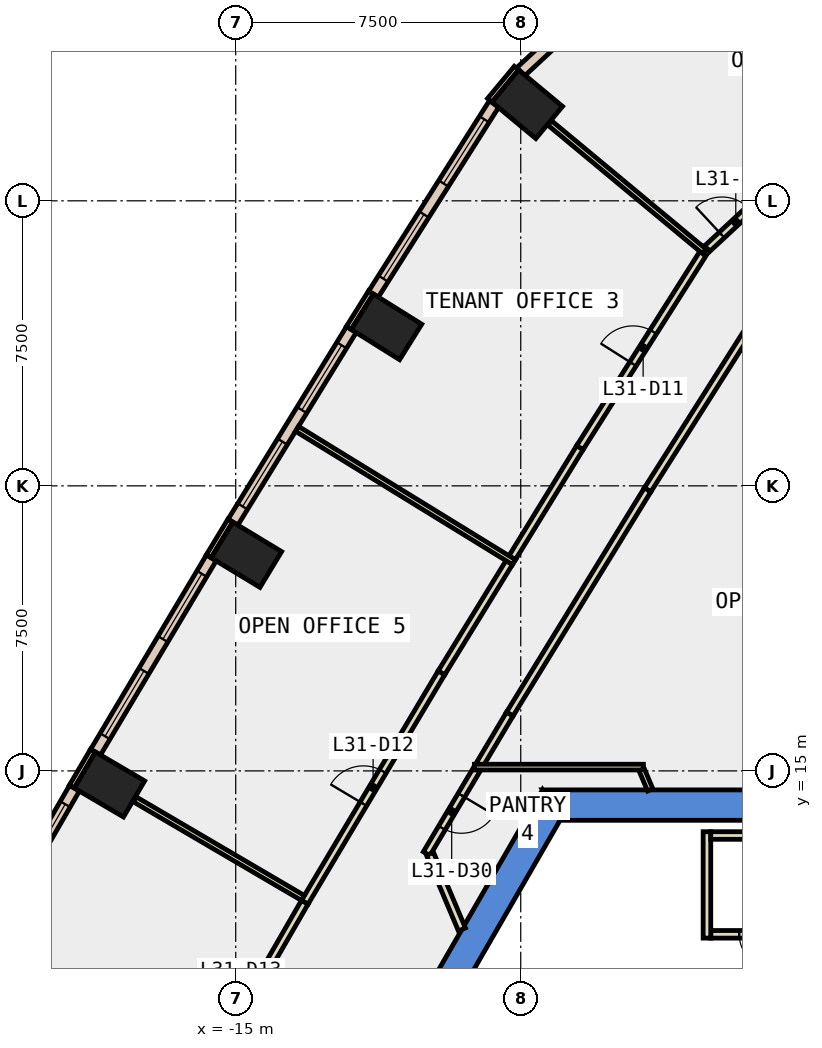
"""IFC4 building model, lengths in metres.
Left out: names, types, materials, properties, quantities, classifications, styles, units other than length and angle.
Written with IfcOpenShell. Run it as: python <this file> out.ifc"""

import sys

from ifc_helpers import new_model, si_unit, direction, frame, frame_2d, origin, origin_2d, place, context, subcontext, project, spatial, polyline, rectangle, outline, extrude, element, fill, save


model = new_model("IFC4")
c1 = context("Model", 3, precision=1e-05, world=origin(), true_north=direction((0.0, 1.0)))
c2 = subcontext(c1, "Body", "Model", "MODEL_VIEW")
j1 = project(units=[si_unit("LENGTHUNIT", "METRE"), si_unit("PLANEANGLEUNIT", "RADIAN")], contexts=[c1])
p1 = place(None, origin())
s1 = spatial("IfcSite", under=j1, at=p1, CompositionType="ELEMENT")
p2 = place(p1, origin())
s2 = spatial("IfcBuilding", under=s1, at=p2, CompositionType="ELEMENT")
p3 = place(p2, frame((0.0, 0.0, 142.4)))
s3 = spatial("IfcBuildingStorey", under=s2, at=p3, CompositionType="ELEMENT", Elevation=142.4)
for number, where, z_axis, x_axis in (
    (1, (-7.329, 32.541, -0.4), (0.0, 0.0, 1.0), (0.639, 0.769, 0.0)),
    (2, (-11.033, 26.684, -0.4), (0.0, 0.0, 1.0), (0.53, 0.848, 0.0)),
    (3, (-14.719, 20.688, -0.4), (0.0, 0.0, 1.0), (0.518, 0.855, 0.0)),
    (4, (-18.322, 14.642, -0.4), (0.0, 0.0, 1.0), (0.506, 0.863, 0.0)),
):
    element("IfcColumn", number, at=place(p3, frame(where, z_axis=z_axis, x_axis=x_axis)), inside=s3, PredefinedType="COLUMN", context=c2, shape_type="SweptSolid", body=[
        extrude(rectangle(XDim=1.1, YDim=1.5, at=origin_2d()), origin(), (0.0, 0.0, 1.0), 4.2),
    ])
p4 = place(p3, frame((0.0, 0.0, -0.4)))
e5 = element("IfcWall", 5, at=p4, inside=s3, PredefinedType="SHEAR", context=c2, shape_type="SweptSolid", body=[
    extrude(outline(polyline([(6.928, 14.5), (-6.928, 14.5), (-6.466, 13.7), (6.466, 13.7), (6.928, 14.5)])), origin(), (0.0, 0.0, 1.0), 4.2),
])
p5 = place(p3, frame((0.0, 0.0, -0.4)))
e6 = element("IfcWall", 6, at=p5, inside=s3, PredefinedType="SHEAR", context=c2, shape_type="SweptSolid", body=[
    extrude(outline(polyline([(-12.267, 5.252), (-11.575, 4.852), (-6.466, 13.7), (-6.928, 14.5), (-12.267, 5.252)])), origin(), (0.0, 0.0, 1.0), 4.2),
])
p6 = place(p3, frame((-7.612, 33.491, 0.0), z_axis=(0.0, 0.0, 1.0), x_axis=(-0.639070205934, -0.769148406933, 0.0)))
e7 = element("IfcWall", 7, at=p6, inside=s3, PredefinedType="STANDARD", context=c2, shape_type="SweptSolid", body=[
    extrude(rectangle(XDim=1.1, YDim=0.15, at=frame_2d((0.55, 0.0))), origin(), (0.0, 0.0, 1.0), 3.8),
])
for number, where, z_axis, x_axis in (
    (8, (-11.441, 27.588, 0.0), (0.0, 0.0, 1.0), (-0.53, -0.848, 0.0)),
    (9, (-15.14, 21.586, 0.0), (0.0, 0.0, 1.0), (-0.518, -0.855, 0.0)),
):
    element("IfcWall", number, at=place(p3, frame(where, z_axis=z_axis, x_axis=x_axis)), inside=s3, PredefinedType="STANDARD", context=c2, shape_type="SweptSolid", body=[
        extrude(rectangle(XDim=1.1, YDim=0.15, at=frame_2d((0.55, 0.0))), origin(), (0.0, 0.0, 1.0), 3.8),
    ])
p7 = place(p3, frame((-18.755, 15.533, 0.0), z_axis=(0.0, 0.0, 1.0), x_axis=(-0.50667077411, -0.862139621327, 0.0)))
e10 = element("IfcWall", 10, at=p7, inside=s3, PredefinedType="STANDARD", context=c2, shape_type="SweptSolid", body=[
    extrude(rectangle(XDim=1.1, YDim=0.15, at=frame_2d((0.55, 0.0))), origin(), (0.0, 0.0, 1.0), 3.8),
])
p8 = place(p3, frame((-4.91, 35.805, 0.0), z_axis=(0.0, 0.0, 1.0), x_axis=(-0.732121882671, -0.681173655475, 0.0)))
e11 = element("IfcWall", 11, at=p8, inside=s3, PredefinedType="STANDARD", context=c2, shape_type="SweptSolid", body=[
    extrude(rectangle(XDim=3.536, YDim=0.3, at=frame_2d((1.768, 0.0))), origin(), (0.0, 0.0, 1.0), 3.8),
])
p9 = place(p8, frame((1.068, 0.0, 0.9)))
e12 = element("IfcOpeningElement", 12, at=p9, cuts=e11, PredefinedType="OPENING", context=c2, shape_type="SweptSolid", body=[
    extrude(rectangle(XDim=1.4, YDim=2.6, at=frame_2d((0.7, 1.3))), frame((0.0, 0.16, 0.0), z_axis=(0.0, -1.0, 0.0), x_axis=(1.0, 0.0, 0.0)), (0.0, 0.0, 1.0), 0.32),
])
p10 = place(p3, frame((-8.201, 32.552, 0.0), z_axis=(0.0, 0.0, 1.0), x_axis=(-0.535403761464, -0.844596242124, 0.0)))
e13 = element("IfcWall", 13, at=p10, inside=s3, PredefinedType="STANDARD", context=c2, shape_type="SweptSolid", body=[
    extrude(rectangle(XDim=5.928, YDim=0.3, at=frame_2d((2.964, 0.0))), origin(), (0.0, 0.0, 1.0), 3.8),
])
p11 = place(p10, frame((0.482, 0.0, 0.9)))
e14 = element("IfcOpeningElement", 14, at=p11, cuts=e13, PredefinedType="OPENING", context=c2, shape_type="SweptSolid", body=[
    extrude(rectangle(XDim=2.0, YDim=2.6, at=frame_2d((1.0, 1.3))), frame((0.0, 0.16, 0.0), z_axis=(0.0, -1.0, 0.0), x_axis=(1.0, 0.0, 0.0)), (0.0, 0.0, 1.0), 0.32),
])
p12 = place(p10, frame((3.446, 0.0, 0.9)))
e15 = element("IfcOpeningElement", 15, at=p12, cuts=e13, PredefinedType="OPENING", context=c2, shape_type="SweptSolid", body=[
    extrude(rectangle(XDim=2.0, YDim=2.6, at=frame_2d((1.0, 1.3))), frame((0.0, 0.16, 0.0), z_axis=(0.0, -1.0, 0.0), x_axis=(1.0, 0.0, 0.0)), (0.0, 0.0, 1.0), 0.32),
])
p13 = place(p3, frame((-11.956, 26.614, 0.0), z_axis=(0.0, 0.0, 1.0), x_axis=(-0.523719731127, -0.851890628677, 0.0)))
e16 = element("IfcWall", 16, at=p13, inside=s3, PredefinedType="STANDARD", context=c2, shape_type="SweptSolid", body=[
    extrude(rectangle(XDim=5.952, YDim=0.3, at=frame_2d((2.976, 0.0))), origin(), (0.0, 0.0, 1.0), 3.8),
])
p14 = place(p13, frame((0.488, 0.0, 0.9)))
e17 = element("IfcOpeningElement", 17, at=p14, cuts=e16, PredefinedType="OPENING", context=c2, shape_type="SweptSolid", body=[
    extrude(rectangle(XDim=2.0, YDim=2.6, at=frame_2d((1.0, 1.3))), frame((0.0, 0.16, 0.0), z_axis=(0.0, -1.0, 0.0), x_axis=(1.0, 0.0, 0.0)), (0.0, 0.0, 1.0), 0.32),
])
p15 = place(p13, frame((3.464, 0.0, 0.9)))
e18 = element("IfcOpeningElement", 18, at=p15, cuts=e16, PredefinedType="OPENING", context=c2, shape_type="SweptSolid", body=[
    extrude(rectangle(XDim=2.0, YDim=2.6, at=frame_2d((1.0, 1.3))), frame((0.0, 0.16, 0.0), z_axis=(0.0, -1.0, 0.0), x_axis=(1.0, 0.0, 0.0)), (0.0, 0.0, 1.0), 0.32),
])
p16 = place(p3, frame((-15.642, 20.605, 0.0), z_axis=(0.0, 0.0, 1.0), x_axis=(-0.511856715331, -0.859070836992, 0.0)))
e19 = element("IfcWall", 19, at=p16, inside=s3, PredefinedType="STANDARD", context=c2, shape_type="SweptSolid", body=[
    extrude(rectangle(XDim=5.951, YDim=0.3, at=frame_2d((2.975, 0.0))), origin(), (0.0, 0.0, 1.0), 3.8),
])
p17 = place(p16, frame((0.488, 0.0, 0.9)))
e20 = element("IfcOpeningElement", 20, at=p17, cuts=e19, PredefinedType="OPENING", context=c2, shape_type="SweptSolid", body=[
    extrude(rectangle(XDim=2.0, YDim=2.6, at=frame_2d((1.0, 1.3))), frame((0.0, 0.16, 0.0), z_axis=(0.0, -1.0, 0.0), x_axis=(1.0, 0.0, 0.0)), (0.0, 0.0, 1.0), 0.32),
])
p18 = place(p16, frame((3.463, 0.0, 0.9)))
e21 = element("IfcOpeningElement", 21, at=p18, cuts=e19, PredefinedType="OPENING", context=c2, shape_type="SweptSolid", body=[
    extrude(rectangle(XDim=2.0, YDim=2.6, at=frame_2d((1.0, 1.3))), frame((0.0, 0.16, 0.0), z_axis=(0.0, -1.0, 0.0), x_axis=(1.0, 0.0, 0.0)), (0.0, 0.0, 1.0), 0.32),
])
p19 = place(p3, frame((-19.243, 14.546, 0.0), z_axis=(0.0, 0.0, 1.0), x_axis=(-0.49994263896, -0.866058518664, 0.0)))
e22 = element("IfcWall", 22, at=p19, inside=s3, PredefinedType="STANDARD", context=c2, shape_type="SweptSolid", body=[
    extrude(rectangle(XDim=5.951, YDim=0.3, at=frame_2d((2.976, 0.0))), origin(), (0.0, 0.0, 1.0), 3.8),
])
p20 = place(p19, frame((0.488, 0.0, 0.9)))
e23 = element("IfcOpeningElement", 23, at=p20, cuts=e22, PredefinedType="OPENING", context=c2, shape_type="SweptSolid", body=[
    extrude(rectangle(XDim=2.0, YDim=2.6, at=frame_2d((1.0, 1.3))), frame((0.0, 0.16, 0.0), z_axis=(0.0, -1.0, 0.0), x_axis=(1.0, 0.0, 0.0)), (0.0, 0.0, 1.0), 0.32),
])
p21 = place(p19, frame((3.463, 0.0, 0.9)))
e24 = element("IfcOpeningElement", 24, at=p21, cuts=e22, PredefinedType="OPENING", context=c2, shape_type="SweptSolid", body=[
    extrude(rectangle(XDim=2.0, YDim=2.6, at=frame_2d((1.0, 1.3))), frame((0.0, 0.16, 0.0), z_axis=(0.0, -1.0, 0.0), x_axis=(1.0, 0.0, 0.0)), (0.0, 0.0, 1.0), 0.32),
])
p22 = place(p3, frame((-8.658, 15.036, 0.0), z_axis=(0.0, 0.0, 1.0), x_axis=(-0.511860217954, -0.859068750029, 0.0)))
e25 = element("IfcWall", 25, at=p22, inside=s3, PredefinedType="PARTITIONING", context=c2, shape_type="SweptSolid", body=[
    extrude(rectangle(XDim=2.577, YDim=0.2, at=frame_2d((1.289, 0.0))), origin(), (0.0, 0.0, 1.0), 3.8),
])
p23 = place(p22, frame((0.788, 0.0, 0.0)))
e26 = element("IfcOpeningElement", 26, at=p23, cuts=e25, PredefinedType="OPENING", context=c2, shape_type="SweptSolid", body=[
    extrude(rectangle(XDim=1.0, YDim=2.1, at=frame_2d((0.5, 1.05))), frame((0.0, 0.11, 0.0), z_axis=(0.0, -1.0, 0.0), x_axis=(1.0, 0.0, 0.0)), (0.0, 0.0, 1.0), 0.22),
])
p24 = place(p3, frame((-9.887, 12.816, 0.0), z_axis=(0.0, 0.0, 1.0), x_axis=(0.388765037942, -0.921336933632, 0.0)))
e27 = element("IfcWall", 27, at=p24, inside=s3, PredefinedType="PARTITIONING", context=c2, shape_type="SweptSolid", body=[
    extrude(rectangle(XDim=2.158, YDim=0.2, at=frame_2d((1.079, 0.0))), origin(), (0.0, 0.0, 1.0), 3.8),
])
p25 = place(p3, frame((-0.988, 27.401, 0.0), z_axis=(0.0, 0.0, 1.0), x_axis=(-0.535496886312, -0.844537201519, 0.0)))
e28 = element("IfcWall", 28, at=p25, inside=s3, PredefinedType="PARTITIONING", context=c2, shape_type="SweptSolid", body=[
    extrude(rectangle(XDim=5.927, YDim=0.2, at=frame_2d((2.964, 0.0))), origin(), (0.0, 0.0, 1.0), 3.8),
])
p26 = place(p3, frame((-4.162, 22.395, 0.0), z_axis=(0.0, 0.0, 1.0), x_axis=(-0.523625371849, -0.851948631055, 0.0)))
e29 = element("IfcWall", 29, at=p26, inside=s3, PredefinedType="PARTITIONING", context=c2, shape_type="SweptSolid", body=[
    extrude(rectangle(XDim=6.927, YDim=0.2, at=frame_2d((3.463, 0.0))), origin(), (0.0, 0.0, 1.0), 3.8),
])
p27 = place(p3, frame((-7.789, 16.494, 0.0), z_axis=(0.0, 0.0, 1.0), x_axis=(-0.511686277462, -0.859172365394, 0.0)))
e30 = element("IfcWall", 30, at=p27, inside=s3, PredefinedType="PARTITIONING", context=c2, shape_type="SweptSolid", body=[
    extrude(rectangle(XDim=1.548, YDim=0.2, at=frame_2d((0.774, 0.0))), origin(), (0.0, 0.0, 1.0), 3.8),
])
p28 = place(p3, frame((-2.597, 28.738, 0.0), z_axis=(0.0, 0.0, 1.0), x_axis=(0.73206471367, 0.681235095249, 0.0)))
e31 = element("IfcWall", 31, at=p28, inside=s3, PredefinedType="PARTITIONING", context=c2, shape_type="SweptSolid", body=[
    extrude(rectangle(XDim=2.065, YDim=0.2, at=frame_2d((1.033, 0.0))), origin(), (0.0, 0.0, 1.0), 3.8),
])
p29 = place(p28, frame((0.532, 0.0, 0.0)))
e32 = element("IfcOpeningElement", 32, at=p29, cuts=e31, PredefinedType="OPENING", context=c2, shape_type="SweptSolid", body=[
    extrude(rectangle(XDim=1.0, YDim=2.1, at=frame_2d((0.5, 1.05))), frame((0.0, 0.11, 0.0), z_axis=(0.0, -1.0, 0.0), x_axis=(1.0, 0.0, 0.0)), (0.0, 0.0, 1.0), 0.22),
])
p30 = place(p3, frame((-7.725, 20.608, 0.0), z_axis=(0.0, 0.0, 1.0), x_axis=(0.523645038298, 0.851936543333, 0.0)))
e33 = element("IfcWall", 33, at=p30, inside=s3, PredefinedType="PARTITIONING", context=c2, shape_type="SweptSolid", body=[
    extrude(rectangle(XDim=3.403, YDim=0.2, at=frame_2d((1.702, 0.0))), origin(), (0.0, 0.0, 1.0), 3.8),
])
p31 = place(p3, frame((-5.943, 23.507, 0.0), z_axis=(0.0, 0.0, 1.0), x_axis=(0.535529721247, 0.844516380931, 0.0)))
e34 = element("IfcWall", 34, at=p31, inside=s3, PredefinedType="PARTITIONING", context=c2, shape_type="SweptSolid", body=[
    extrude(rectangle(XDim=6.213, YDim=0.2, at=frame_2d((3.106, 0.0))), origin(), (0.0, 0.0, 1.0), 3.8),
])
p32 = place(p31, frame((2.607, 0.0, 0.0)))
e35 = element("IfcOpeningElement", 35, at=p32, cuts=e34, PredefinedType="OPENING", context=c2, shape_type="SweptSolid", body=[
    extrude(rectangle(XDim=1.0, YDim=2.1, at=frame_2d((0.5, 1.05))), frame((0.0, 0.11, 0.0), z_axis=(0.0, -1.0, 0.0), x_axis=(1.0, 0.0, 0.0)), (0.0, 0.0, 1.0), 0.22),
])
p33 = place(p3, frame((-13.184, 11.542, 0.0), z_axis=(0.0, 0.0, 1.0), x_axis=(0.511847713534, 0.859076200433, 0.0)))
e36 = element("IfcWall", 36, at=p33, inside=s3, PredefinedType="PARTITIONING", context=c2, shape_type="SweptSolid", body=[
    extrude(rectangle(XDim=7.03, YDim=0.2, at=frame_2d((3.515, 0.0))), origin(), (0.0, 0.0, 1.0), 3.8),
])
p34 = place(p33, frame((3.015, 0.0, 0.0)))
e37 = element("IfcOpeningElement", 37, at=p34, cuts=e36, PredefinedType="OPENING", context=c2, shape_type="SweptSolid", body=[
    extrude(rectangle(XDim=1.0, YDim=2.1, at=frame_2d((0.5, 1.05))), frame((0.0, 0.11, 0.0), z_axis=(0.0, -1.0, 0.0), x_axis=(1.0, 0.0, 0.0)), (0.0, 0.0, 1.0), 0.22),
])
p35 = place(p3, frame((-9.586, 17.581, 0.0), z_axis=(0.0, 0.0, 1.0), x_axis=(0.523757261565, 0.851867554822, 0.0)))
e38 = element("IfcWall", 38, at=p35, inside=s3, PredefinedType="PARTITIONING", context=c2, shape_type="SweptSolid", body=[
    extrude(rectangle(XDim=3.404, YDim=0.2, at=frame_2d((1.702, 0.0))), origin(), (0.0, 0.0, 1.0), 3.8),
])
p36 = place(p3, frame((-16.624, 5.582, 0.0), z_axis=(0.0, 0.0, 1.0), x_axis=(0.499886250151, 0.866091067331, 0.0)))
e39 = element("IfcWall", 39, at=p36, inside=s3, PredefinedType="PARTITIONING", context=c2, shape_type="SweptSolid", body=[
    extrude(rectangle(XDim=6.881, YDim=0.2, at=frame_2d((3.441, 0.0))), origin(), (0.0, 0.0, 1.0), 3.8),
])
p37 = place(p36, frame((3.015, 0.0, 0.0)))
e40 = element("IfcOpeningElement", 40, at=p37, cuts=e39, PredefinedType="OPENING", context=c2, shape_type="SweptSolid", body=[
    extrude(rectangle(XDim=1.0, YDim=2.1, at=frame_2d((0.5, 1.05))), frame((0.0, 0.11, 0.0), z_axis=(0.0, -1.0, 0.0), x_axis=(1.0, 0.0, 0.0)), (0.0, 0.0, 1.0), 0.22),
])
p38 = place(p3, frame((-0.1, 10.7, 0.0), z_axis=(0.0, 0.0, 1.0), x_axis=(-1.0, 0.0, 0.0)))
e41 = element("IfcWall", 41, at=p38, inside=s3, PredefinedType="PARTITIONING", context=c2, shape_type="SweptSolid", body=[
    extrude(rectangle(XDim=2.4, YDim=0.2, at=frame_2d((1.2, 0.0))), origin(), (0.0, 0.0, 1.0), 3.8),
])
p39 = place(p38, frame((0.75, 0.0, 0.0)))
e42 = element("IfcOpeningElement", 42, at=p39, cuts=e41, PredefinedType="OPENING", context=c2, shape_type="SweptSolid", body=[
    extrude(rectangle(XDim=0.9, YDim=2.1, at=frame_2d((0.45, 1.05))), frame((0.0, 0.11, 0.0), z_axis=(0.0, -1.0, 0.0), x_axis=(1.0, 0.0, 0.0)), (0.0, 0.0, 1.0), 0.22),
])
p40 = place(p3, frame((-2.6, 10.6, 0.0), z_axis=(0.0, 0.0, 1.0), x_axis=(0.0, 1.0, 0.0)))
e43 = element("IfcWall", 43, at=p40, inside=s3, PredefinedType="PARTITIONING", context=c2, shape_type="SweptSolid", body=[
    extrude(rectangle(XDim=2.8, YDim=0.2, at=frame_2d((1.4, 0.0))), origin(), (0.0, 0.0, 1.0), 3.8),
])
p41 = place(p3, frame((-2.5, 13.3, 0.0), z_axis=(0.0, 0.0, 1.0), x_axis=(1.0, 0.0, 0.0)))
e44 = element("IfcWall", 44, at=p41, inside=s3, PredefinedType="PARTITIONING", context=c2, shape_type="SweptSolid", body=[
    extrude(rectangle(XDim=2.4, YDim=0.2, at=frame_2d((1.2, 0.0))), origin(), (0.0, 0.0, 1.0), 3.8),
])
p42 = place(p3, frame((-4.272, 15.1, 0.0), z_axis=(0.0, 0.0, 1.0), x_axis=(-1.0, 0.0, 0.0)))
e45 = element("IfcWall", 45, at=p42, inside=s3, PredefinedType="PARTITIONING", context=c2, shape_type="SweptSolid", body=[
    extrude(rectangle(XDim=4.448, YDim=0.15, at=frame_2d((2.224, 0.0))), origin(), (0.0, 0.0, 1.0), 3.8),
])
p43 = place(p3, frame((-4.093, 14.5, 0.0), z_axis=(0.0, 0.0, 1.0), x_axis=(-0.390288929197, 0.92069243059, 0.0)))
e46 = element("IfcWall", 46, at=p43, inside=s3, PredefinedType="PARTITIONING", context=c2, shape_type="SweptSolid", body=[
    extrude(rectangle(XDim=0.577, YDim=0.15, at=frame_2d((0.288, 0.0))), origin(), (0.0, 0.0, 1.0), 3.8),
])
p44 = place(p3, frame((-2.67, 28.67, 0.0), z_axis=(0.0, 0.0, 1.0), x_axis=(-0.769162789992, 0.639052894909, 0.0)))
e47 = element("IfcWall", 47, at=p44, inside=s3, PredefinedType="PARTITIONING", context=c2, shape_type="SweptSolid", body=[
    extrude(rectangle(XDim=5.288, YDim=0.15, at=frame_2d((2.644, 0.0))), origin(), (0.0, 0.0, 1.0), 3.8),
])
p45 = place(p3, frame((-7.679, 20.492, 0.0), z_axis=(0.0, 0.0, 1.0), x_axis=(-0.851897179877, 0.523709074695, 0.0)))
e48 = element("IfcWall", 48, at=p45, inside=s3, PredefinedType="PARTITIONING", context=c2, shape_type="SweptSolid", body=[
    extrude(rectangle(XDim=6.7, YDim=0.15, at=frame_2d((3.35, 0.0))), origin(), (0.0, 0.0, 1.0), 3.8),
])
p46 = place(p3, frame((-13.232, 11.657, 0.0), z_axis=(0.0, 0.0, 1.0), x_axis=(-0.862663606034, 0.505778116197, 0.0)))
e49 = element("IfcWall", 49, at=p46, inside=s3, PredefinedType="PARTITIONING", context=c2, shape_type="SweptSolid", body=[
    extrude(rectangle(XDim=5.131, YDim=0.15, at=frame_2d((2.565, 0.0))), origin(), (0.0, 0.0, 1.0), 3.8),
])
p47 = place(p11, origin())
e50 = element("IfcWindow", 50, at=p47, inside=s3, PartitioningType="SINGLE_PANEL", PredefinedType="WINDOW", context=c2, shape_type="SweptSolid", body=[
    extrude(rectangle(XDim=2.0, YDim=2.6, at=frame_2d((1.0, 1.3))), frame((0.0, 0.03, 0.0), z_axis=(0.0, -1.0, 0.0), x_axis=(1.0, 0.0, 0.0)), (0.0, 0.0, 1.0), 0.06),
])
fill(e14, e50)
p48 = place(p12, origin())
e51 = element("IfcWindow", 51, at=p48, inside=s3, PartitioningType="SINGLE_PANEL", PredefinedType="WINDOW", context=c2, shape_type="SweptSolid", body=[
    extrude(rectangle(XDim=2.0, YDim=2.6, at=frame_2d((1.0, 1.3))), frame((0.0, 0.03, 0.0), z_axis=(0.0, -1.0, 0.0), x_axis=(1.0, 0.0, 0.0)), (0.0, 0.0, 1.0), 0.06),
])
fill(e15, e51)
p49 = place(p14, origin())
e52 = element("IfcWindow", 52, at=p49, inside=s3, PartitioningType="SINGLE_PANEL", PredefinedType="WINDOW", context=c2, shape_type="SweptSolid", body=[
    extrude(rectangle(XDim=2.0, YDim=2.6, at=frame_2d((1.0, 1.3))), frame((0.0, 0.03, 0.0), z_axis=(0.0, -1.0, 0.0), x_axis=(1.0, 0.0, 0.0)), (0.0, 0.0, 1.0), 0.06),
])
fill(e17, e52)
p50 = place(p15, origin())
e53 = element("IfcWindow", 53, at=p50, inside=s3, PartitioningType="SINGLE_PANEL", PredefinedType="WINDOW", context=c2, shape_type="SweptSolid", body=[
    extrude(rectangle(XDim=2.0, YDim=2.6, at=frame_2d((1.0, 1.3))), frame((0.0, 0.03, 0.0), z_axis=(0.0, -1.0, 0.0), x_axis=(1.0, 0.0, 0.0)), (0.0, 0.0, 1.0), 0.06),
])
fill(e18, e53)
p51 = place(p17, origin())
e54 = element("IfcWindow", 54, at=p51, inside=s3, PartitioningType="SINGLE_PANEL", PredefinedType="WINDOW", context=c2, shape_type="SweptSolid", body=[
    extrude(rectangle(XDim=2.0, YDim=2.6, at=frame_2d((1.0, 1.3))), frame((0.0, 0.03, 0.0), z_axis=(0.0, -1.0, 0.0), x_axis=(1.0, 0.0, 0.0)), (0.0, 0.0, 1.0), 0.06),
])
fill(e20, e54)
p52 = place(p18, origin())
e55 = element("IfcWindow", 55, at=p52, inside=s3, PartitioningType="SINGLE_PANEL", PredefinedType="WINDOW", context=c2, shape_type="SweptSolid", body=[
    extrude(rectangle(XDim=2.0, YDim=2.6, at=frame_2d((1.0, 1.3))), frame((0.0, 0.03, 0.0), z_axis=(0.0, -1.0, 0.0), x_axis=(1.0, 0.0, 0.0)), (0.0, 0.0, 1.0), 0.06),
])
fill(e21, e55)
p53 = place(p20, origin())
e56 = element("IfcWindow", 56, at=p53, inside=s3, PartitioningType="SINGLE_PANEL", PredefinedType="WINDOW", context=c2, shape_type="SweptSolid", body=[
    extrude(rectangle(XDim=2.0, YDim=2.6, at=frame_2d((1.0, 1.3))), frame((0.0, 0.03, 0.0), z_axis=(0.0, -1.0, 0.0), x_axis=(1.0, 0.0, 0.0)), (0.0, 0.0, 1.0), 0.06),
])
fill(e23, e56)
p54 = place(p29, origin())
e57 = element("IfcDoor", 57, at=p54, inside=s3, OperationType="SINGLE_SWING_LEFT", PredefinedType="DOOR", context=c2, shape_type="SweptSolid", body=[
    extrude(rectangle(XDim=1.0, YDim=2.1, at=frame_2d((0.5, 1.05))), frame((0.0, 0.025, 0.0), z_axis=(0.0, -1.0, 0.0), x_axis=(1.0, 0.0, 0.0)), (0.0, 0.0, 1.0), 0.05),
])
fill(e32, e57)
p55 = place(p32, origin())
e58 = element("IfcDoor", 58, at=p55, inside=s3, OperationType="SINGLE_SWING_LEFT", PredefinedType="DOOR", context=c2, shape_type="SweptSolid", body=[
    extrude(rectangle(XDim=1.0, YDim=2.1, at=frame_2d((0.5, 1.05))), frame((0.0, 0.025, 0.0), z_axis=(0.0, -1.0, 0.0), x_axis=(1.0, 0.0, 0.0)), (0.0, 0.0, 1.0), 0.05),
])
fill(e35, e58)
p56 = place(p34, origin())
e59 = element("IfcDoor", 59, at=p56, inside=s3, OperationType="SINGLE_SWING_RIGHT", PredefinedType="DOOR", context=c2, shape_type="SweptSolid", body=[
    extrude(rectangle(XDim=1.0, YDim=2.1, at=frame_2d((0.5, 1.05))), frame((0.0, 0.025, 0.0), z_axis=(0.0, -1.0, 0.0), x_axis=(1.0, 0.0, 0.0)), (0.0, 0.0, 1.0), 0.05),
])
fill(e37, e59)
p57 = place(p23, origin())
e60 = element("IfcDoor", 60, at=p57, inside=s3, OperationType="SINGLE_SWING_LEFT", PredefinedType="DOOR", context=c2, shape_type="SweptSolid", body=[
    extrude(rectangle(XDim=1.0, YDim=2.1, at=frame_2d((0.5, 1.05))), frame((0.0, 0.025, 0.0), z_axis=(0.0, -1.0, 0.0), x_axis=(1.0, 0.0, 0.0)), (0.0, 0.0, 1.0), 0.05),
])
fill(e26, e60)
p58 = place(p39, origin())
e61 = element("IfcDoor", 61, at=p58, inside=s3, OperationType="SINGLE_SWING_RIGHT", PredefinedType="DOOR", context=c2, shape_type="SweptSolid", body=[
    extrude(rectangle(XDim=0.9, YDim=2.1, at=frame_2d((0.45, 1.05))), frame((0.0, 0.025, 0.0), z_axis=(0.0, -1.0, 0.0), x_axis=(1.0, 0.0, 0.0)), (0.0, 0.0, 1.0), 0.05),
])
fill(e42, e61)
save(model, sys.argv[1])
